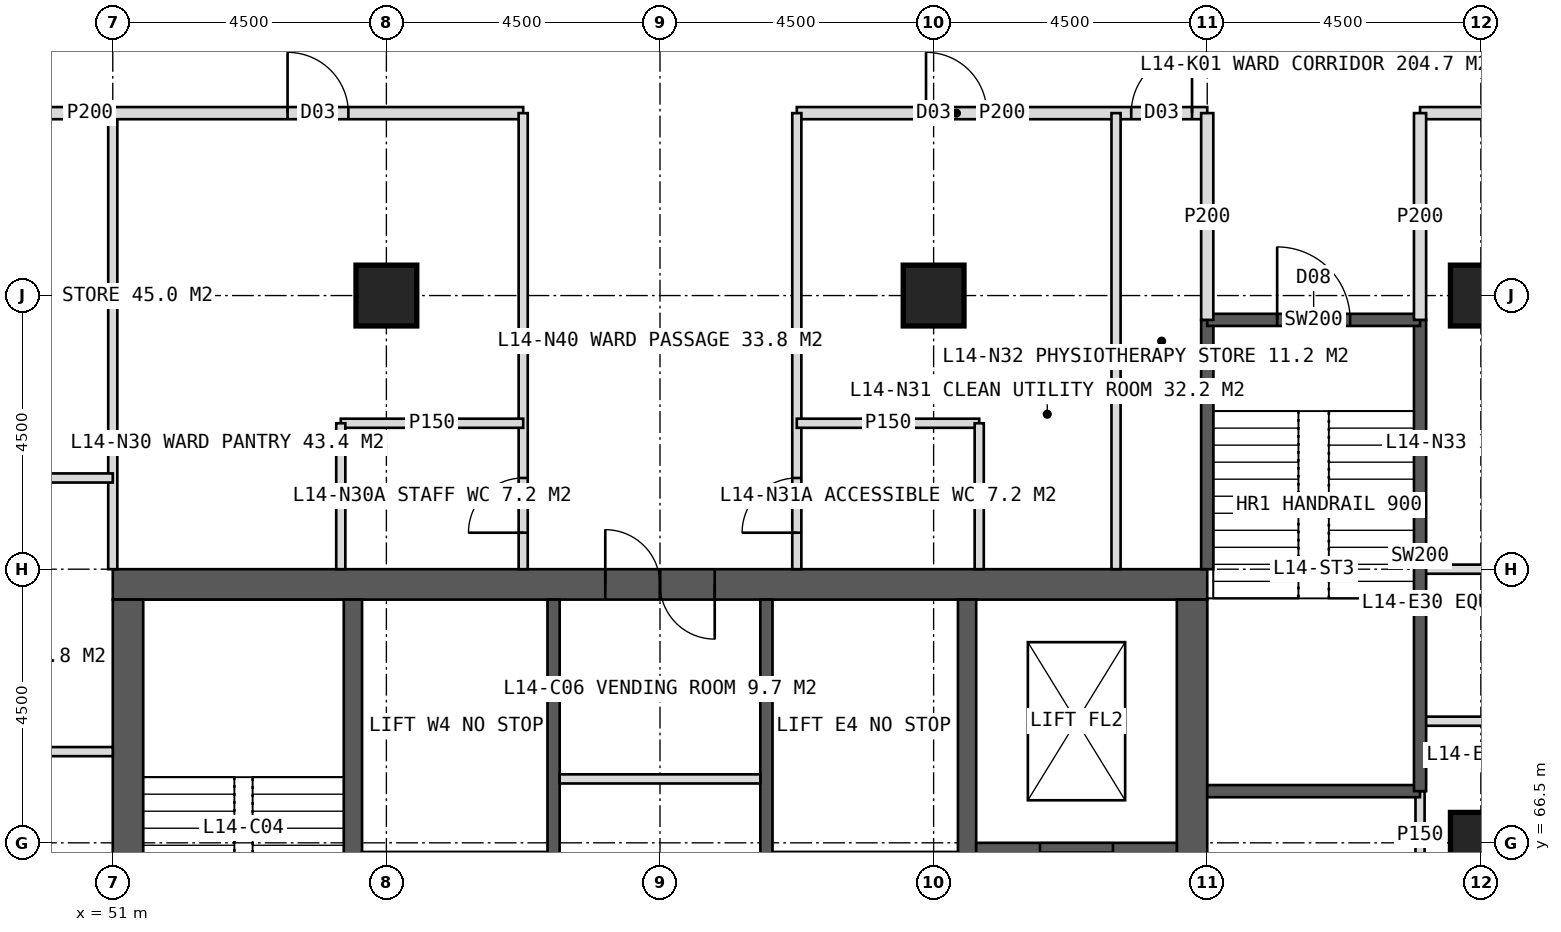
"""IFC4 building model, lengths in metres.
Left out: names, types, materials, properties, quantities, classifications, styles, units other than length and angle.
Written with IfcOpenShell. Run it as: python <this file> out.ifc"""

import sys

from ifc_helpers import new_model, si_unit, direction, frame, frame_2d, origin, origin_2d, place, context, subcontext, project, spatial, rectangle, hollow_rectangle, extrude, element, fill, save


model = new_model("IFC4")
c1 = context("Model", 3, precision=1e-05, world=origin(), true_north=direction((0.0, 1.0)))
c2 = subcontext(c1, "Body", "Model", "MODEL_VIEW")
j1 = project(units=[si_unit("LENGTHUNIT", "METRE"), si_unit("PLANEANGLEUNIT", "RADIAN")], contexts=[c1])
p1 = place(None, origin())
s1 = spatial("IfcSite", under=j1, at=p1, CompositionType="ELEMENT")
p2 = place(p1, origin())
s2 = spatial("IfcBuilding", under=s1, at=p2, CompositionType="ELEMENT")
p3 = place(p2, frame((0.0, 0.0, 63.0)))
s3 = spatial("IfcBuildingStorey", under=s2, at=p3, CompositionType="ELEMENT", Elevation=63.0)
p4 = place(p3, frame((51.0, 70.75, 0.0), z_axis=(0.0, 0.0, 1.0), x_axis=(1.0, 0.0, 0.0)))
e1 = element("IfcWall", 1, at=p4, inside=s3, PredefinedType="SHEAR", context=c2, shape_type="SweptSolid", body=[
    extrude(rectangle(XDim=18.0, YDim=0.5, at=frame_2d((9.0, 0.0))), origin(), (0.0, 0.0, 1.0), 4.0),
])
p5 = place(p4, frame((8.1, 0.0, 0.0)))
e2 = element("IfcOpeningElement", 2, at=p5, cuts=e1, PredefinedType="OPENING", context=c2, shape_type="SweptSolid", body=[
    extrude(rectangle(XDim=1.8, YDim=2.2, at=frame_2d((0.9, 1.1))), frame((0.0, 0.26, 0.0), z_axis=(0.0, -1.0, 0.0), x_axis=(1.0, 0.0, 0.0)), (0.0, 0.0, 1.0), 0.52),
])
p6 = place(p3, frame((51.25, 53.5, 0.0), z_axis=(0.0, 0.0, 1.0), x_axis=(0.0, 1.0, 0.0)))
e3 = element("IfcWall", 3, at=p6, inside=s3, PredefinedType="SHEAR", context=c2, shape_type="SweptSolid", body=[
    extrude(rectangle(XDim=17.0, YDim=0.5, at=frame_2d((8.5, 0.0))), origin(), (0.0, 0.0, 1.0), 4.0),
])
p7 = place(p6, frame((6.0, 0.0, 0.0)))
e4 = element("IfcOpeningElement", 4, at=p7, cuts=e3, PredefinedType="OPENING", context=c2, shape_type="SweptSolid", body=[
    extrude(rectangle(XDim=1.5, YDim=2.2, at=frame_2d((0.75, 1.1))), frame((0.0, 0.26, 0.0), z_axis=(0.0, -1.0, 0.0), x_axis=(1.0, 0.0, 0.0)), (0.0, 0.0, 1.0), 0.52),
])
p8 = place(p3, frame((68.75, 53.5, 0.0), z_axis=(0.0, 0.0, 1.0), x_axis=(0.0, 1.0, 0.0)))
e5 = element("IfcWall", 5, at=p8, inside=s3, PredefinedType="SHEAR", context=c2, shape_type="SweptSolid", body=[
    extrude(rectangle(XDim=17.0, YDim=0.5, at=frame_2d((8.5, 0.0))), origin(), (0.0, 0.0, 1.0), 4.0),
])
p9 = place(p8, frame((9.5, 0.0, 0.0)))
e6 = element("IfcOpeningElement", 6, at=p9, cuts=e5, PredefinedType="OPENING", context=c2, shape_type="SweptSolid", body=[
    extrude(rectangle(XDim=1.5, YDim=2.2, at=frame_2d((0.75, 1.1))), frame((0.0, 0.26, 0.0), z_axis=(0.0, -1.0, 0.0), x_axis=(1.0, 0.0, 0.0)), (0.0, 0.0, 1.0), 0.52),
])
for number, where, z_axis, x_axis in (
    (7, (54.95, 53.5, 0.0), (0.0, 0.0, 1.0), (0.0, 1.0, 0.0)),
    (8, (65.05, 53.5, 0.0), (0.0, 0.0, 1.0), (0.0, 1.0, 0.0)),
):
    element("IfcWall", number, at=place(p3, frame(where, z_axis=z_axis, x_axis=x_axis)), inside=s3, PredefinedType="SHEAR", context=c2, shape_type="SweptSolid", body=[
        extrude(rectangle(XDim=17.0, YDim=0.3, at=frame_2d((8.5, 0.0))), origin(), (0.0, 0.0, 1.0), 4.0),
    ])
p10 = place(p3, frame((58.25, 53.5, 0.0), z_axis=(0.0, 0.0, 1.0), x_axis=(0.0, 1.0, 0.0)))
e9 = element("IfcWall", 9, at=p10, inside=s3, PredefinedType="SHEAR", context=c2, shape_type="SweptSolid", body=[
    extrude(rectangle(XDim=17.0, YDim=0.2, at=frame_2d((8.5, 0.0))), origin(), (0.0, 0.0, 1.0), 4.0),
])
p11 = place(p10, frame((1.375, 0.0, 0.0)))
e10 = element("IfcOpeningElement", 10, at=p11, cuts=e9, PredefinedType="OPENING", context=c2, shape_type="SweptSolid", body=[
    extrude(rectangle(XDim=1.4, YDim=2.2, at=frame_2d((0.7, 1.1))), frame((0.0, 0.11, 0.0), z_axis=(0.0, -1.0, 0.0), x_axis=(1.0, 0.0, 0.0)), (0.0, 0.0, 1.0), 0.22),
])
p12 = place(p10, frame((5.675, 0.0, 0.0)))
e11 = element("IfcOpeningElement", 11, at=p12, cuts=e9, PredefinedType="OPENING", context=c2, shape_type="SweptSolid", body=[
    extrude(rectangle(XDim=1.4, YDim=2.2, at=frame_2d((0.7, 1.1))), frame((0.0, 0.11, 0.0), z_axis=(0.0, -1.0, 0.0), x_axis=(1.0, 0.0, 0.0)), (0.0, 0.0, 1.0), 0.22),
])
p13 = place(p3, frame((61.75, 53.5, 0.0), z_axis=(0.0, 0.0, 1.0), x_axis=(0.0, 1.0, 0.0)))
e12 = element("IfcWall", 12, at=p13, inside=s3, PredefinedType="SHEAR", context=c2, shape_type="SweptSolid", body=[
    extrude(rectangle(XDim=17.0, YDim=0.2, at=frame_2d((8.5, 0.0))), origin(), (0.0, 0.0, 1.0), 4.0),
])
p14 = place(p13, frame((1.375, 0.0, 0.0)))
e13 = element("IfcOpeningElement", 13, at=p14, cuts=e12, PredefinedType="OPENING", context=c2, shape_type="SweptSolid", body=[
    extrude(rectangle(XDim=1.4, YDim=2.2, at=frame_2d((0.7, 1.1))), frame((0.0, 0.11, 0.0), z_axis=(0.0, -1.0, 0.0), x_axis=(1.0, 0.0, 0.0)), (0.0, 0.0, 1.0), 0.22),
])
p15 = place(p13, frame((5.675, 0.0, 0.0)))
e14 = element("IfcOpeningElement", 14, at=p15, cuts=e12, PredefinedType="OPENING", context=c2, shape_type="SweptSolid", body=[
    extrude(rectangle(XDim=1.4, YDim=2.2, at=frame_2d((0.7, 1.1))), frame((0.0, 0.11, 0.0), z_axis=(0.0, -1.0, 0.0), x_axis=(1.0, 0.0, 0.0)), (0.0, 0.0, 1.0), 0.22),
])
p16 = place(p3, frame((65.2, 66.35, 0.0), z_axis=(0.0, 0.0, 1.0), x_axis=(1.0, 0.0, 0.0)))
e15 = element("IfcWall", 15, at=p16, inside=s3, PredefinedType="SHEAR", context=c2, shape_type="SweptSolid", body=[
    extrude(rectangle(XDim=3.3, YDim=0.3, at=frame_2d((1.65, 0.0))), origin(), (0.0, 0.0, 1.0), 4.0),
])
p17 = place(p16, frame((1.05, 0.0, 0.0)))
e16 = element("IfcOpeningElement", 16, at=p17, cuts=e15, PredefinedType="OPENING", context=c2, shape_type="SweptSolid", body=[
    extrude(rectangle(XDim=1.2, YDim=2.2, at=frame_2d((0.6, 1.1))), frame((0.0, 0.16, 0.0), z_axis=(0.0, -1.0, 0.0), x_axis=(1.0, 0.0, 0.0)), (0.0, 0.0, 1.0), 0.32),
])
for number, where, z_axis, x_axis in (
    (17, (73.5, 75.5, 0.0), (0.0, 0.0, 1.0), (1.0, 0.0, 0.0)),
    (18, (55.5, 75.5, 0.0), (0.0, 0.0, 1.0), (1.0, 0.0, 0.0)),
    (19, (64.5, 75.5, 0.0), (0.0, 0.0, 1.0), (1.0, 0.0, 0.0)),
    (20, (73.5, 66.5, 0.0), (0.0, 0.0, 1.0), (1.0, 0.0, 0.0)),
):
    element("IfcColumn", number, at=place(p3, frame(where, z_axis=z_axis, x_axis=x_axis)), inside=s3, PredefinedType="COLUMN", context=c2, shape_type="SweptSolid", body=[
        extrude(hollow_rectangle(XDim=1.0, YDim=1.0, WallThickness=0.1, at=origin_2d()), origin(), (0.0, 0.0, 1.0), 4.0),
    ])
p18 = place(p3, frame((51.0, 71.0, 0.0), z_axis=(0.0, 0.0, 1.0), x_axis=(0.0, 1.0, 0.0)))
e21 = element("IfcWall", 21, at=p18, inside=s3, PredefinedType="PARTITIONING", context=c2, shape_type="SweptSolid", body=[
    extrude(rectangle(XDim=7.5, YDim=0.15, at=frame_2d((3.75, 0.0))), origin(), (0.0, 0.0, 1.0), 3.75),
])
p19 = place(p3, frame((43.5, 78.5, 0.0), z_axis=(0.0, 0.0, 1.0), x_axis=(1.0, 0.0, 0.0)))
e22 = element("IfcWall", 22, at=p19, inside=s3, PredefinedType="PARTITIONING", context=c2, shape_type="SweptSolid", body=[
    extrude(rectangle(XDim=14.25, YDim=0.2, at=frame_2d((7.125, 0.0))), origin(), (0.0, 0.0, 1.0), 3.75),
])
p20 = place(p19, frame((10.375, 0.0, 0.0)))
e23 = element("IfcOpeningElement", 23, at=p20, cuts=e22, PredefinedType="OPENING", context=c2, shape_type="SweptSolid", body=[
    extrude(rectangle(XDim=1.0, YDim=2.1, at=frame_2d((0.5, 1.05))), frame((0.0, 0.11, 0.0), z_axis=(0.0, -1.0, 0.0), x_axis=(1.0, 0.0, 0.0)), (0.0, 0.0, 1.0), 0.22),
])
p21 = place(p3, frame((62.25, 78.5, 0.0), z_axis=(0.0, 0.0, 1.0), x_axis=(1.0, 0.0, 0.0)))
e24 = element("IfcWall", 24, at=p21, inside=s3, PredefinedType="PARTITIONING", context=c2, shape_type="SweptSolid", body=[
    extrude(rectangle(XDim=6.75, YDim=0.2, at=frame_2d((3.375, 0.0))), origin(), (0.0, 0.0, 1.0), 3.75),
])
p22 = place(p21, frame((2.125, 0.0, 0.0)))
e25 = element("IfcOpeningElement", 25, at=p22, cuts=e24, PredefinedType="OPENING", context=c2, shape_type="SweptSolid", body=[
    extrude(rectangle(XDim=1.0, YDim=2.1, at=frame_2d((0.5, 1.05))), frame((0.0, 0.11, 0.0), z_axis=(0.0, -1.0, 0.0), x_axis=(1.0, 0.0, 0.0)), (0.0, 0.0, 1.0), 0.22),
])
p23 = place(p21, frame((5.5, 0.0, 0.0)))
e26 = element("IfcOpeningElement", 26, at=p23, cuts=e24, PredefinedType="OPENING", context=c2, shape_type="SweptSolid", body=[
    extrude(rectangle(XDim=1.0, YDim=2.1, at=frame_2d((0.5, 1.05))), frame((0.0, 0.11, 0.0), z_axis=(0.0, -1.0, 0.0), x_axis=(1.0, 0.0, 0.0)), (0.0, 0.0, 1.0), 0.22),
])
p24 = place(p3, frame((72.5, 78.5, 0.0), z_axis=(0.0, 0.0, 1.0), x_axis=(1.0, 0.0, 0.0)))
e27 = element("IfcWall", 27, at=p24, inside=s3, PredefinedType="PARTITIONING", context=c2, shape_type="SweptSolid", body=[
    extrude(rectangle(XDim=4.0, YDim=0.2, at=frame_2d((2.0, 0.0))), origin(), (0.0, 0.0, 1.0), 3.75),
])
p25 = place(p24, frame((1.25, 0.0, 0.0)))
e28 = element("IfcOpeningElement", 28, at=p25, cuts=e27, PredefinedType="OPENING", context=c2, shape_type="SweptSolid", body=[
    extrude(rectangle(XDim=1.0, YDim=2.1, at=frame_2d((0.5, 1.05))), frame((0.0, 0.11, 0.0), z_axis=(0.0, -1.0, 0.0), x_axis=(1.0, 0.0, 0.0)), (0.0, 0.0, 1.0), 0.22),
])
p26 = place(p3, frame((57.75, 71.0, 0.0), z_axis=(0.0, 0.0, 1.0), x_axis=(0.0, 1.0, 0.0)))
e29 = element("IfcWall", 29, at=p26, inside=s3, PredefinedType="PARTITIONING", context=c2, shape_type="SweptSolid", body=[
    extrude(rectangle(XDim=7.5, YDim=0.15, at=frame_2d((3.75, 0.0))), origin(), (0.0, 0.0, 1.0), 3.75),
])
p27 = place(p26, frame((0.6, 0.0, 0.0)))
e30 = element("IfcOpeningElement", 30, at=p27, cuts=e29, PredefinedType="OPENING", context=c2, shape_type="SweptSolid", body=[
    extrude(rectangle(XDim=0.9, YDim=2.1, at=frame_2d((0.45, 1.05))), frame((0.0, 0.085, 0.0), z_axis=(0.0, -1.0, 0.0), x_axis=(1.0, 0.0, 0.0)), (0.0, 0.0, 1.0), 0.17),
])
p28 = place(p3, frame((62.25, 71.0, 0.0), z_axis=(0.0, 0.0, 1.0), x_axis=(0.0, 1.0, 0.0)))
e31 = element("IfcWall", 31, at=p28, inside=s3, PredefinedType="PARTITIONING", context=c2, shape_type="SweptSolid", body=[
    extrude(rectangle(XDim=7.5, YDim=0.15, at=frame_2d((3.75, 0.0))), origin(), (0.0, 0.0, 1.0), 3.75),
])
p29 = place(p28, frame((0.6, 0.0, 0.0)))
e32 = element("IfcOpeningElement", 32, at=p29, cuts=e31, PredefinedType="OPENING", context=c2, shape_type="SweptSolid", body=[
    extrude(rectangle(XDim=0.9, YDim=2.1, at=frame_2d((0.45, 1.05))), frame((0.0, 0.085, 0.0), z_axis=(0.0, -1.0, 0.0), x_axis=(1.0, 0.0, 0.0)), (0.0, 0.0, 1.0), 0.17),
])
p30 = place(p3, frame((67.5, 71.0, 0.0), z_axis=(0.0, 0.0, 1.0), x_axis=(0.0, 1.0, 0.0)))
e33 = element("IfcWall", 33, at=p30, inside=s3, PredefinedType="PARTITIONING", context=c2, shape_type="SweptSolid", body=[
    extrude(rectangle(XDim=7.5, YDim=0.15, at=frame_2d((3.75, 0.0))), origin(), (0.0, 0.0, 1.0), 3.75),
])
p31 = place(p3, frame((54.75, 73.4, 0.0), z_axis=(0.0, 0.0, 1.0), x_axis=(1.0, 0.0, 0.0)))
e34 = element("IfcWall", 34, at=p31, inside=s3, PredefinedType="PARTITIONING", context=c2, shape_type="SweptSolid", body=[
    extrude(rectangle(XDim=3.0, YDim=0.15, at=frame_2d((1.5, 0.0))), origin(), (0.0, 0.0, 1.0), 3.75),
])
p32 = place(p3, frame((54.75, 71.0, 0.0), z_axis=(0.0, 0.0, 1.0), x_axis=(0.0, 1.0, 0.0)))
e35 = element("IfcWall", 35, at=p32, inside=s3, PredefinedType="PARTITIONING", context=c2, shape_type="SweptSolid", body=[
    extrude(rectangle(XDim=2.4, YDim=0.15, at=frame_2d((1.2, 0.0))), origin(), (0.0, 0.0, 1.0), 3.75),
])
p33 = place(p3, frame((62.25, 73.4, 0.0), z_axis=(0.0, 0.0, 1.0), x_axis=(1.0, 0.0, 0.0)))
e36 = element("IfcWall", 36, at=p33, inside=s3, PredefinedType="PARTITIONING", context=c2, shape_type="SweptSolid", body=[
    extrude(rectangle(XDim=3.0, YDim=0.15, at=frame_2d((1.5, 0.0))), origin(), (0.0, 0.0, 1.0), 3.75),
])
p34 = place(p3, frame((65.25, 71.0, 0.0), z_axis=(0.0, 0.0, 1.0), x_axis=(0.0, 1.0, 0.0)))
e37 = element("IfcWall", 37, at=p34, inside=s3, PredefinedType="PARTITIONING", context=c2, shape_type="SweptSolid", body=[
    extrude(rectangle(XDim=2.4, YDim=0.15, at=frame_2d((1.2, 0.0))), origin(), (0.0, 0.0, 1.0), 3.75),
])
for number, where, z_axis, x_axis in (
    (38, (51.0, 68.0, 0.0), (0.0, 0.0, 1.0), (-1.0, 0.0, 0.0)),
    (39, (51.0, 72.5, 0.0), (0.0, 0.0, 1.0), (-1.0, 0.0, 0.0)),
):
    element("IfcWall", number, at=place(p3, frame(where, z_axis=z_axis, x_axis=x_axis)), inside=s3, PredefinedType="PARTITIONING", context=c2, shape_type="SweptSolid", body=[
        extrude(rectangle(XDim=7.5, YDim=0.15, at=frame_2d((3.75, 0.0))), origin(), (0.0, 0.0, 1.0), 3.75),
    ])
for number, where, z_axis, x_axis in (
    (40, (72.5, 71.0, 0.0), (0.0, 0.0, 1.0), (1.0, 0.0, 0.0)),
    (41, (72.5, 68.5, 0.0), (0.0, 0.0, 1.0), (1.0, 0.0, 0.0)),
):
    element("IfcWall", number, at=place(p3, frame(where, z_axis=z_axis, x_axis=x_axis)), inside=s3, PredefinedType="PARTITIONING", context=c2, shape_type="SweptSolid", body=[
        extrude(rectangle(XDim=4.0, YDim=0.15, at=frame_2d((2.0, 0.0))), origin(), (0.0, 0.0, 1.0), 3.75),
    ])
p35 = place(p3, frame((58.35, 67.551, 0.0), z_axis=(0.0, 0.0, 1.0), x_axis=(1.0, 0.0, 0.0)))
e42 = element("IfcWall", 42, at=p35, inside=s3, PredefinedType="PARTITIONING", context=c2, shape_type="SweptSolid", body=[
    extrude(rectangle(XDim=3.3, YDim=0.15, at=frame_2d((1.65, 0.0))), origin(), (0.0, 0.0, 1.0), 3.75),
])
p36 = place(p3, frame((72.5, 65.9, 0.0), z_axis=(0.0, 0.0, 1.0), x_axis=(0.0, 1.0, 0.0)))
e43 = element("IfcWall", 43, at=p36, inside=s3, PredefinedType="PARTITIONING", context=c2, shape_type="SweptSolid", body=[
    extrude(rectangle(XDim=1.45, YDim=0.15, at=frame_2d((0.725, 0.0))), origin(), (0.0, 0.0, 1.0), 3.75),
])
p37 = place(p3, frame((69.0, 71.0, 0.0), z_axis=(0.0, 0.0, 1.0), x_axis=(0.0, 1.0, 0.0)))
e44 = element("IfcWall", 44, at=p37, inside=s3, PredefinedType="SOLIDWALL", context=c2, shape_type="SweptSolid", body=[
    extrude(rectangle(XDim=4.1, YDim=0.2, at=frame_2d((2.05, 0.0))), origin(), (0.0, 0.0, 1.0), 3.75),
])
p38 = place(p3, frame((69.0, 67.35, 0.0), z_axis=(0.0, 0.0, 1.0), x_axis=(1.0, 0.0, 0.0)))
e45 = element("IfcWall", 45, at=p38, inside=s3, PredefinedType="SOLIDWALL", context=c2, shape_type="SweptSolid", body=[
    extrude(rectangle(XDim=3.5, YDim=0.2, at=frame_2d((1.75, 0.0))), origin(), (0.0, 0.0, 1.0), 3.75),
])
p39 = place(p3, frame((72.5, 67.35, 0.0), z_axis=(0.0, 0.0, 1.0), x_axis=(0.0, 1.0, 0.0)))
e46 = element("IfcWall", 46, at=p39, inside=s3, PredefinedType="SOLIDWALL", context=c2, shape_type="SweptSolid", body=[
    extrude(rectangle(XDim=7.75, YDim=0.2, at=frame_2d((3.875, 0.0))), origin(), (0.0, 0.0, 1.0), 3.75),
])
p40 = place(p3, frame((69.0, 75.1, 0.0), z_axis=(0.0, 0.0, 1.0), x_axis=(1.0, 0.0, 0.0)))
e47 = element("IfcWall", 47, at=p40, inside=s3, PredefinedType="SOLIDWALL", context=c2, shape_type="SweptSolid", body=[
    extrude(rectangle(XDim=3.5, YDim=0.2, at=frame_2d((1.75, 0.0))), origin(), (0.0, 0.0, 1.0), 3.75),
])
p41 = place(p40, frame((1.15, 0.0, 0.0)))
e48 = element("IfcOpeningElement", 48, at=p41, cuts=e47, PredefinedType="OPENING", context=c2, shape_type="SweptSolid", body=[
    extrude(rectangle(XDim=1.2, YDim=2.1, at=frame_2d((0.6, 1.05))), frame((0.0, 0.11, 0.0), z_axis=(0.0, -1.0, 0.0), x_axis=(1.0, 0.0, 0.0)), (0.0, 0.0, 1.0), 0.22),
])
for number, where, z_axis, x_axis in (
    (49, (69.0, 75.1, 0.0), (0.0, 0.0, 1.0), (0.0, 1.0, 0.0)),
    (50, (72.5, 75.1, 0.0), (0.0, 0.0, 1.0), (0.0, 1.0, 0.0)),
):
    element("IfcWall", number, at=place(p3, frame(where, z_axis=z_axis, x_axis=x_axis)), inside=s3, PredefinedType="PARTITIONING", context=c2, shape_type="SweptSolid", body=[
        extrude(rectangle(XDim=3.4, YDim=0.2, at=frame_2d((1.7, 0.0))), origin(), (0.0, 0.0, 1.0), 3.75),
    ])
p42 = place(p27, origin())
e51 = element("IfcDoor", 51, at=p42, inside=s3, OperationType="SINGLE_SWING_LEFT", PredefinedType="DOOR", context=c2, shape_type="SweptSolid", body=[
    extrude(rectangle(XDim=0.9, YDim=2.1, at=frame_2d((0.45, 1.05))), frame((0.0, 0.025, 0.0), z_axis=(0.0, -1.0, 0.0), x_axis=(1.0, 0.0, 0.0)), (0.0, 0.0, 1.0), 0.05),
])
fill(e30, e51)
p43 = place(p20, origin())
e52 = element("IfcDoor", 52, at=p43, inside=s3, OperationType="SINGLE_SWING_LEFT", PredefinedType="DOOR", context=c2, shape_type="SweptSolid", body=[
    extrude(rectangle(XDim=1.0, YDim=2.1, at=frame_2d((0.5, 1.05))), frame((0.0, 0.025, 0.0), z_axis=(0.0, -1.0, 0.0), x_axis=(1.0, 0.0, 0.0)), (0.0, 0.0, 1.0), 0.05),
])
fill(e23, e52)
p44 = place(p29, origin())
e53 = element("IfcDoor", 53, at=p44, inside=s3, OperationType="SINGLE_SWING_LEFT", PredefinedType="DOOR", context=c2, shape_type="SweptSolid", body=[
    extrude(rectangle(XDim=0.9, YDim=2.1, at=frame_2d((0.45, 1.05))), frame((0.0, 0.025, 0.0), z_axis=(0.0, -1.0, 0.0), x_axis=(1.0, 0.0, 0.0)), (0.0, 0.0, 1.0), 0.05),
])
fill(e32, e53)
p45 = place(p22, origin())
e54 = element("IfcDoor", 54, at=p45, inside=s3, OperationType="SINGLE_SWING_LEFT", PredefinedType="DOOR", context=c2, shape_type="SweptSolid", body=[
    extrude(rectangle(XDim=1.0, YDim=2.1, at=frame_2d((0.5, 1.05))), frame((0.0, 0.025, 0.0), z_axis=(0.0, -1.0, 0.0), x_axis=(1.0, 0.0, 0.0)), (0.0, 0.0, 1.0), 0.05),
])
fill(e25, e54)
p46 = place(p23, origin())
e55 = element("IfcDoor", 55, at=p46, inside=s3, OperationType="SINGLE_SWING_RIGHT", PredefinedType="DOOR", context=c2, shape_type="SweptSolid", body=[
    extrude(rectangle(XDim=1.0, YDim=2.1, at=frame_2d((0.5, 1.05))), frame((0.0, 0.025, 0.0), z_axis=(0.0, -1.0, 0.0), x_axis=(1.0, 0.0, 0.0)), (0.0, 0.0, 1.0), 0.05),
])
fill(e26, e55)
p47 = place(p17, origin())
e56 = element("IfcDoor", 56, at=p47, inside=s3, OperationType="SLIDING_TO_LEFT", PredefinedType="DOOR", context=c2, shape_type="SweptSolid", body=[
    extrude(rectangle(XDim=1.2, YDim=2.2, at=frame_2d((0.6, 1.1))), frame((0.0, 0.025, 0.0), z_axis=(0.0, -1.0, 0.0), x_axis=(1.0, 0.0, 0.0)), (0.0, 0.0, 1.0), 0.05),
])
fill(e16, e56)
p48 = place(p5, origin())
e57 = element("IfcDoor", 57, at=p48, inside=s3, OperationType="DOUBLE_DOOR_SINGLE_SWING", PredefinedType="DOOR", context=c2, shape_type="SweptSolid", body=[
    extrude(rectangle(XDim=1.8, YDim=2.2, at=frame_2d((0.9, 1.1))), frame((0.0, 0.025, 0.0), z_axis=(0.0, -1.0, 0.0), x_axis=(1.0, 0.0, 0.0)), (0.0, 0.0, 1.0), 0.05),
])
fill(e2, e57)
p49 = place(p41, origin())
e58 = element("IfcDoor", 58, at=p49, inside=s3, OperationType="SINGLE_SWING_LEFT", PredefinedType="DOOR", context=c2, shape_type="SweptSolid", body=[
    extrude(rectangle(XDim=1.2, YDim=2.1, at=frame_2d((0.6, 1.05))), frame((0.0, 0.025, 0.0), z_axis=(0.0, -1.0, 0.0), x_axis=(1.0, 0.0, 0.0)), (0.0, 0.0, 1.0), 0.05),
])
fill(e48, e58)
save(model, sys.argv[1])
